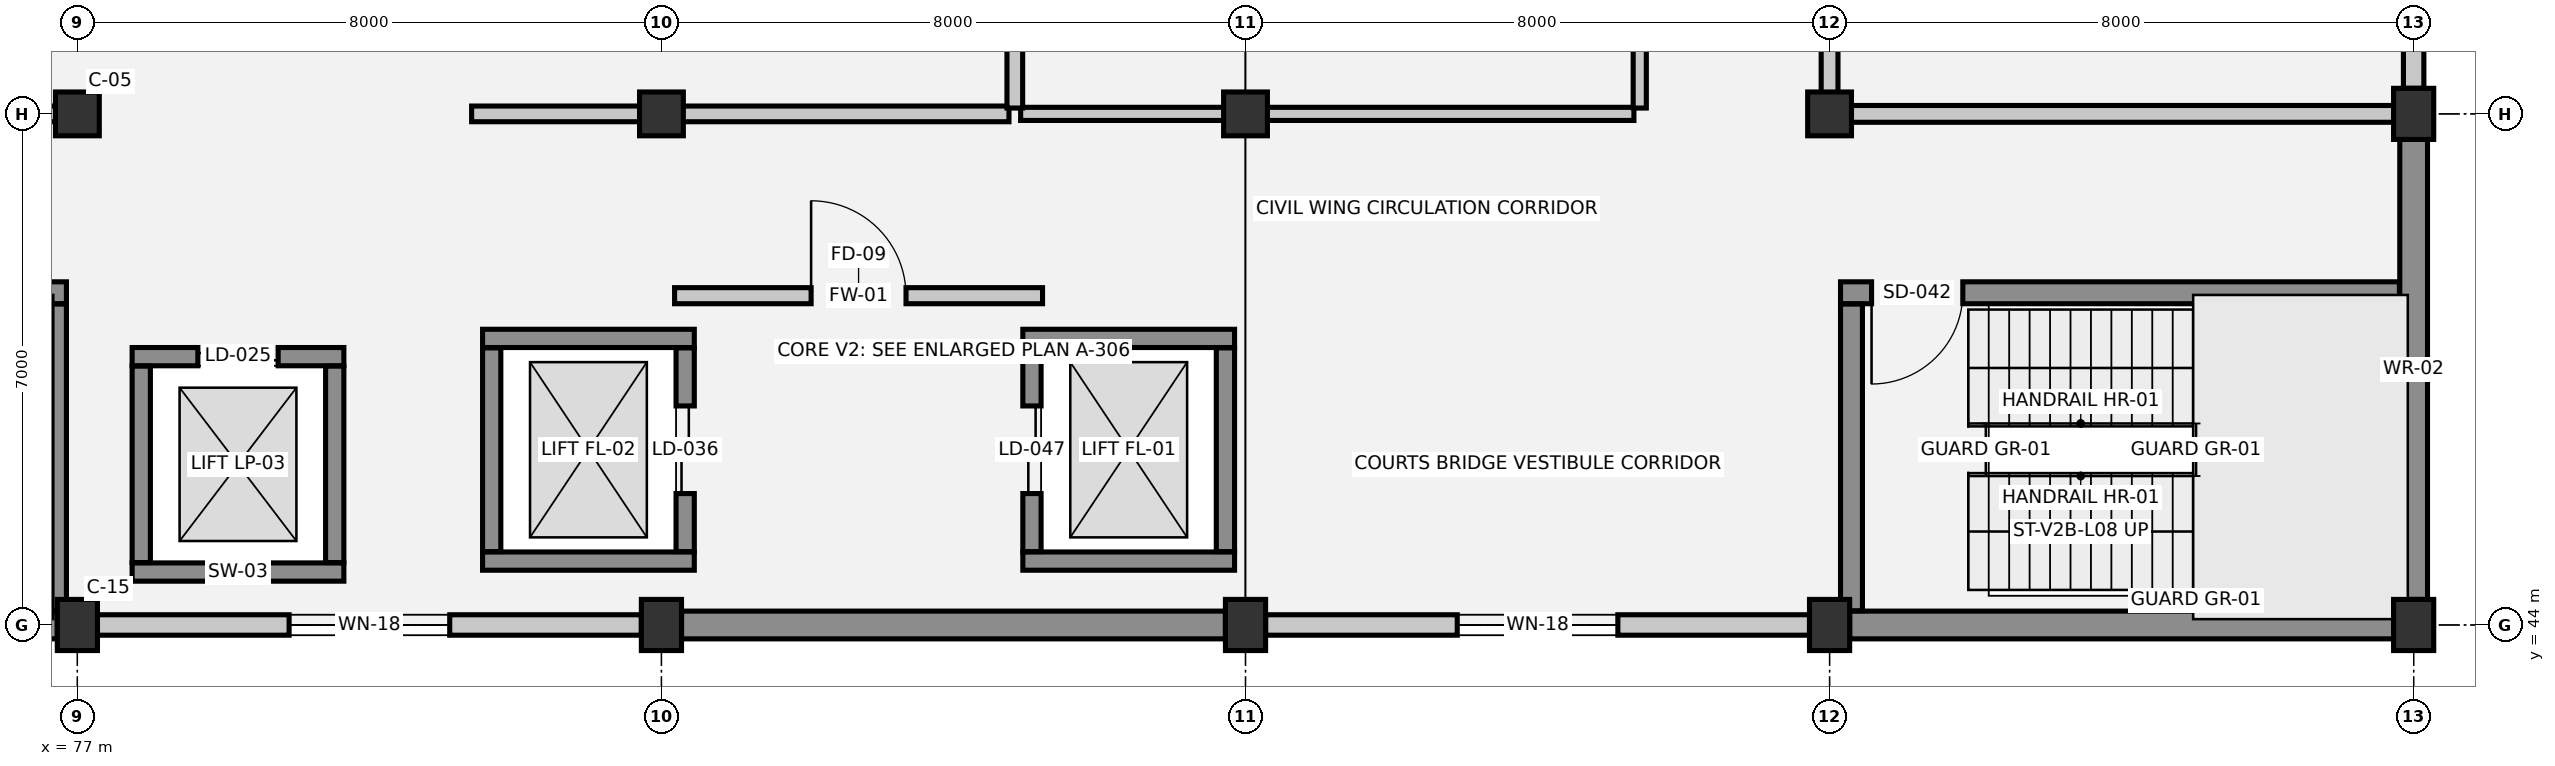
"""IFC4 building model, lengths in metres.
Left out: names, types, materials, properties, quantities, classifications, styles, units other than length and angle.
Written with IfcOpenShell. Run it as: python <this file> out.ifc"""

import sys

from ifc_helpers import new_model, si_unit, direction, frame, frame_2d, origin, origin_2d, place, context, subcontext, project, spatial, rectangle, extrude, element, fill, save


model = new_model("IFC4")
c1 = context("Model", 3, precision=1e-05, world=origin(), true_north=direction((0.0, 1.0)))
c2 = subcontext(c1, "Body", "Model", "MODEL_VIEW")
j1 = project(units=[si_unit("LENGTHUNIT", "METRE"), si_unit("PLANEANGLEUNIT", "RADIAN")], contexts=[c1])
p1 = place(None, origin())
s1 = spatial("IfcSite", under=j1, at=p1, CompositionType="ELEMENT")
p2 = place(p1, origin())
s2 = spatial("IfcBuilding", under=s1, at=p2, CompositionType="ELEMENT")
p3 = place(p2, frame((0.0, 0.0, 29.55)))
s3 = spatial("IfcBuildingStorey", under=s2, at=p3, CompositionType="ELEMENT", Elevation=29.55)
p4 = place(p3, frame((77.0, 44.0, 0.0), z_axis=(0.0, 0.0, 1.0), x_axis=(1.0, 0.0, 0.0)))
e1 = element("IfcColumn", 1, at=p4, inside=s3, PredefinedType="COLUMN", context=c2, shape_type="SweptSolid", body=[
    extrude(rectangle(XDim=0.55, YDim=0.7, at=origin_2d()), origin(), (0.0, 0.0, 1.0), 3.75),
])
p5 = place(p3, frame((77.0, 51.0, 0.0), z_axis=(0.0, 0.0, 1.0), x_axis=(1.0, 0.0, 0.0)))
e2 = element("IfcColumn", 2, at=p5, inside=s3, PredefinedType="COLUMN", context=c2, shape_type="SweptSolid", body=[
    extrude(rectangle(XDim=0.6, YDim=0.6, at=origin_2d()), origin(), (0.0, 0.0, 1.0), 3.75),
])
p6 = place(p3, frame((85.0, 44.0, 0.0), z_axis=(0.0, 0.0, 1.0), x_axis=(1.0, 0.0, 0.0)))
e3 = element("IfcColumn", 3, at=p6, inside=s3, PredefinedType="COLUMN", context=c2, shape_type="SweptSolid", body=[
    extrude(rectangle(XDim=0.55, YDim=0.7, at=origin_2d()), origin(), (0.0, 0.0, 1.0), 3.75),
])
p7 = place(p3, frame((85.0, 51.0, 0.0), z_axis=(0.0, 0.0, 1.0), x_axis=(1.0, 0.0, 0.0)))
e4 = element("IfcColumn", 4, at=p7, inside=s3, PredefinedType="COLUMN", context=c2, shape_type="SweptSolid", body=[
    extrude(rectangle(XDim=0.6, YDim=0.6, at=origin_2d()), origin(), (0.0, 0.0, 1.0), 3.75),
])
p8 = place(p3, frame((93.0, 44.0, 0.0), z_axis=(0.0, 0.0, 1.0), x_axis=(1.0, 0.0, 0.0)))
e5 = element("IfcColumn", 5, at=p8, inside=s3, PredefinedType="COLUMN", context=c2, shape_type="SweptSolid", body=[
    extrude(rectangle(XDim=0.55, YDim=0.7, at=origin_2d()), origin(), (0.0, 0.0, 1.0), 3.75),
])
p9 = place(p3, frame((93.0, 51.0, 0.0), z_axis=(0.0, 0.0, 1.0), x_axis=(1.0, 0.0, 0.0)))
e6 = element("IfcColumn", 6, at=p9, inside=s3, PredefinedType="COLUMN", context=c2, shape_type="SweptSolid", body=[
    extrude(rectangle(XDim=0.6, YDim=0.6, at=origin_2d()), origin(), (0.0, 0.0, 1.0), 3.75),
])
p10 = place(p3, frame((101.0, 44.0, 0.0), z_axis=(0.0, 0.0, 1.0), x_axis=(1.0, 0.0, 0.0)))
e7 = element("IfcColumn", 7, at=p10, inside=s3, PredefinedType="COLUMN", context=c2, shape_type="SweptSolid", body=[
    extrude(rectangle(XDim=0.55, YDim=0.7, at=origin_2d()), origin(), (0.0, 0.0, 1.0), 3.75),
])
p11 = place(p3, frame((101.0, 51.0, 0.0), z_axis=(0.0, 0.0, 1.0), x_axis=(1.0, 0.0, 0.0)))
e8 = element("IfcColumn", 8, at=p11, inside=s3, PredefinedType="COLUMN", context=c2, shape_type="SweptSolid", body=[
    extrude(rectangle(XDim=0.6, YDim=0.6, at=origin_2d()), origin(), (0.0, 0.0, 1.0), 3.75),
])
for number, where, z_axis, x_axis in (
    (9, (109.0, 44.0, 0.0), (0.0, 0.0, 1.0), (1.0, 0.0, 0.0)),
    (10, (109.0, 51.0, 0.0), (0.0, 0.0, 1.0), (1.0, 0.0, 0.0)),
):
    element("IfcColumn", number, at=place(p3, frame(where, z_axis=z_axis, x_axis=x_axis)), inside=s3, PredefinedType="COLUMN", context=c2, shape_type="SweptSolid", body=[
        extrude(rectangle(XDim=0.55, YDim=0.7, at=origin_2d()), origin(), (0.0, 0.0, 1.0), 3.75),
    ])
p12 = place(p3, frame((109.0, 64.65, 0.0), z_axis=(0.0, 0.0, 1.0), x_axis=(0.0, -1.0, 0.0)))
e11 = element("IfcWall", 11, at=p12, inside=s3, PredefinedType="SOLIDWALL", context=c2, shape_type="SweptSolid", body=[
    extrude(rectangle(XDim=13.3, YDim=0.28, at=frame_2d((6.65, 0.0))), origin(), (0.0, 0.0, 1.0), 2.56),
])
p13 = place(p12, frame((5.55, 0.0, 0.9)))
e12 = element("IfcOpeningElement", 12, at=p13, cuts=e11, PredefinedType="OPENING", context=c2, shape_type="SweptSolid", body=[
    extrude(rectangle(XDim=2.2, YDim=1.0, at=frame_2d((1.1, 0.5))), frame((0.0, 0.15, 0.0), z_axis=(0.0, -1.0, 0.0), x_axis=(1.0, 0.0, 0.0)), (0.0, 0.0, 1.0), 0.3),
])
p14 = place(p3, frame((109.0, 50.65, 0.0), z_axis=(0.0, 0.0, 1.0), x_axis=(0.0, -1.0, 0.0)))
e13 = element("IfcWall", 13, at=p14, inside=s3, PredefinedType="STANDARD", context=c2, shape_type="SweptSolid", body=[
    extrude(rectangle(XDim=6.3, YDim=0.38, at=frame_2d((3.15, 0.0))), origin(), (0.0, 0.0, 1.0), 2.56),
])
p15 = place(p3, frame((108.725, 44.0, 0.0), z_axis=(0.0, 0.0, 1.0), x_axis=(-1.0, 0.0, 0.0)))
e14 = element("IfcWall", 14, at=p15, inside=s3, PredefinedType="STANDARD", context=c2, shape_type="SweptSolid", body=[
    extrude(rectangle(XDim=7.45, YDim=0.38, at=frame_2d((3.725, 0.0))), origin(), (0.0, 0.0, 1.0), 2.56),
])
p16 = place(p3, frame((100.725, 44.0, 0.0), z_axis=(0.0, 0.0, 1.0), x_axis=(-1.0, 0.0, 0.0)))
e15 = element("IfcWall", 15, at=p16, inside=s3, PredefinedType="SOLIDWALL", context=c2, shape_type="SweptSolid", body=[
    extrude(rectangle(XDim=7.45, YDim=0.28, at=frame_2d((3.725, 0.0))), origin(), (0.0, 0.0, 1.0), 2.56),
])
p17 = place(p16, frame((2.625, 0.0, 0.9)))
e16 = element("IfcOpeningElement", 16, at=p17, cuts=e15, PredefinedType="OPENING", context=c2, shape_type="SweptSolid", body=[
    extrude(rectangle(XDim=2.2, YDim=1.0, at=frame_2d((1.1, 0.5))), frame((0.0, 0.15, 0.0), z_axis=(0.0, -1.0, 0.0), x_axis=(1.0, 0.0, 0.0)), (0.0, 0.0, 1.0), 0.3),
])
p18 = place(p3, frame((92.725, 44.0, 0.0), z_axis=(0.0, 0.0, 1.0), x_axis=(-1.0, 0.0, 0.0)))
e17 = element("IfcWall", 17, at=p18, inside=s3, PredefinedType="STANDARD", context=c2, shape_type="SweptSolid", body=[
    extrude(rectangle(XDim=7.45, YDim=0.38, at=frame_2d((3.725, 0.0))), origin(), (0.0, 0.0, 1.0), 2.56),
])
p19 = place(p3, frame((84.725, 44.0, 0.0), z_axis=(0.0, 0.0, 1.0), x_axis=(-1.0, 0.0, 0.0)))
e18 = element("IfcWall", 18, at=p19, inside=s3, PredefinedType="SOLIDWALL", context=c2, shape_type="SweptSolid", body=[
    extrude(rectangle(XDim=7.45, YDim=0.28, at=frame_2d((3.725, 0.0))), origin(), (0.0, 0.0, 1.0), 2.56),
])
p20 = place(p19, frame((2.625, 0.0, 0.9)))
e19 = element("IfcOpeningElement", 19, at=p20, cuts=e18, PredefinedType="OPENING", context=c2, shape_type="SweptSolid", body=[
    extrude(rectangle(XDim=2.2, YDim=1.0, at=frame_2d((1.1, 0.5))), frame((0.0, 0.15, 0.0), z_axis=(0.0, -1.0, 0.0), x_axis=(1.0, 0.0, 0.0)), (0.0, 0.0, 1.0), 0.3),
])
p21 = place(p3, frame((76.725, 44.0, 0.0), z_axis=(0.0, 0.0, 1.0), x_axis=(-1.0, 0.0, 0.0)))
e20 = element("IfcWall", 20, at=p21, inside=s3, PredefinedType="STANDARD", context=c2, shape_type="SweptSolid", body=[
    extrude(rectangle(XDim=7.45, YDim=0.38, at=frame_2d((3.725, 0.0))), origin(), (0.0, 0.0, 1.0), 2.56),
])
p22 = place(p3, frame((77.75, 44.725, 0.0), z_axis=(0.0, 0.0, 1.0), x_axis=(1.0, 0.0, 0.0)))
e21 = element("IfcWall", 21, at=p22, inside=s3, PredefinedType="SHEAR", context=c2, shape_type="SweptSolid", body=[
    extrude(rectangle(XDim=2.9, YDim=0.25, at=frame_2d((1.45, 0.0))), origin(), (0.0, 0.0, 1.0), 3.75),
])
p23 = place(p3, frame((80.65, 47.675, 0.0), z_axis=(0.0, 0.0, 1.0), x_axis=(-1.0, 0.0, 0.0)))
e22 = element("IfcWall", 22, at=p23, inside=s3, PredefinedType="SHEAR", context=c2, shape_type="SweptSolid", body=[
    extrude(rectangle(XDim=2.9, YDim=0.25, at=frame_2d((1.45, 0.0))), origin(), (0.0, 0.0, 1.0), 3.75),
])
p24 = place(p23, frame((0.9, 0.0, 0.0)))
e23 = element("IfcOpeningElement", 23, at=p24, cuts=e22, PredefinedType="OPENING", context=c2, shape_type="SweptSolid", body=[
    extrude(rectangle(XDim=1.1, YDim=2.15, at=frame_2d((0.55, 1.075))), frame((0.0, 0.135, 0.0), z_axis=(0.0, -1.0, 0.0), x_axis=(1.0, 0.0, 0.0)), (0.0, 0.0, 1.0), 0.27),
])
for number, where, z_axis, x_axis in (
    (24, (77.875, 47.545, 0.0), (0.0, 0.0, 1.0), (0.0, -1.0, 0.0)),
    (25, (80.525, 44.855, 0.0), (0.0, 0.0, 1.0), (0.0, 1.0, 0.0)),
):
    element("IfcWall", number, at=place(p3, frame(where, z_axis=z_axis, x_axis=x_axis)), inside=s3, PredefinedType="SHEAR", context=c2, shape_type="SweptSolid", body=[
        extrude(rectangle(XDim=2.69, YDim=0.25, at=frame_2d((1.345, 0.0))), origin(), (0.0, 0.0, 1.0), 3.75),
    ])
for number, where, z_axis, x_axis in (
    (26, (82.55, 44.875, 0.0), (0.0, 0.0, 1.0), (1.0, 0.0, 0.0)),
    (27, (85.45, 47.925, 0.0), (0.0, 0.0, 1.0), (-1.0, 0.0, 0.0)),
):
    element("IfcWall", number, at=place(p3, frame(where, z_axis=z_axis, x_axis=x_axis)), inside=s3, PredefinedType="SHEAR", context=c2, shape_type="SweptSolid", body=[
        extrude(rectangle(XDim=2.9, YDim=0.25, at=frame_2d((1.45, 0.0))), origin(), (0.0, 0.0, 1.0), 3.75),
    ])
p25 = place(p3, frame((82.675, 47.795, 0.0), z_axis=(0.0, 0.0, 1.0), x_axis=(0.0, -1.0, 0.0)))
e28 = element("IfcWall", 28, at=p25, inside=s3, PredefinedType="SHEAR", context=c2, shape_type="SweptSolid", body=[
    extrude(rectangle(XDim=2.79, YDim=0.25, at=frame_2d((1.395, 0.0))), origin(), (0.0, 0.0, 1.0), 3.75),
])
p26 = place(p3, frame((85.325, 45.005, 0.0), z_axis=(0.0, 0.0, 1.0), x_axis=(0.0, 1.0, 0.0)))
e29 = element("IfcWall", 29, at=p26, inside=s3, PredefinedType="SHEAR", context=c2, shape_type="SweptSolid", body=[
    extrude(rectangle(XDim=2.79, YDim=0.25, at=frame_2d((1.395, 0.0))), origin(), (0.0, 0.0, 1.0), 3.75),
])
p27 = place(p26, frame((0.795, 0.0, 0.0)))
e30 = element("IfcOpeningElement", 30, at=p27, cuts=e29, PredefinedType="OPENING", context=c2, shape_type="SweptSolid", body=[
    extrude(rectangle(XDim=1.2, YDim=2.2, at=frame_2d((0.6, 1.1))), frame((0.0, 0.135, 0.0), z_axis=(0.0, -1.0, 0.0), x_axis=(1.0, 0.0, 0.0)), (0.0, 0.0, 1.0), 0.27),
])
for number, where, z_axis, x_axis in (
    (31, (89.95, 44.875, 0.0), (0.0, 0.0, 1.0), (1.0, 0.0, 0.0)),
    (32, (92.85, 47.925, 0.0), (0.0, 0.0, 1.0), (-1.0, 0.0, 0.0)),
):
    element("IfcWall", number, at=place(p3, frame(where, z_axis=z_axis, x_axis=x_axis)), inside=s3, PredefinedType="SHEAR", context=c2, shape_type="SweptSolid", body=[
        extrude(rectangle(XDim=2.9, YDim=0.25, at=frame_2d((1.45, 0.0))), origin(), (0.0, 0.0, 1.0), 3.75),
    ])
p28 = place(p3, frame((90.075, 47.795, 0.0), z_axis=(0.0, 0.0, 1.0), x_axis=(0.0, -1.0, 0.0)))
e33 = element("IfcWall", 33, at=p28, inside=s3, PredefinedType="SHEAR", context=c2, shape_type="SweptSolid", body=[
    extrude(rectangle(XDim=2.79, YDim=0.25, at=frame_2d((1.395, 0.0))), origin(), (0.0, 0.0, 1.0), 3.75),
])
p29 = place(p28, frame((0.795, 0.0, 0.0)))
e34 = element("IfcOpeningElement", 34, at=p29, cuts=e33, PredefinedType="OPENING", context=c2, shape_type="SweptSolid", body=[
    extrude(rectangle(XDim=1.2, YDim=2.2, at=frame_2d((0.6, 1.1))), frame((0.0, 0.135, 0.0), z_axis=(0.0, -1.0, 0.0), x_axis=(1.0, 0.0, 0.0)), (0.0, 0.0, 1.0), 0.27),
])
p30 = place(p3, frame((92.725, 45.005, 0.0), z_axis=(0.0, 0.0, 1.0), x_axis=(0.0, 1.0, 0.0)))
e35 = element("IfcWall", 35, at=p30, inside=s3, PredefinedType="SHEAR", context=c2, shape_type="SweptSolid", body=[
    extrude(rectangle(XDim=2.79, YDim=0.25, at=frame_2d((1.395, 0.0))), origin(), (0.0, 0.0, 1.0), 3.75),
])
p31 = place(p3, frame((76.85, 48.55, 0.0), z_axis=(0.0, 0.0, 1.0), x_axis=(-1.0, 0.0, 0.0)))
e36 = element("IfcWall", 36, at=p31, inside=s3, PredefinedType="SHEAR", context=c2, shape_type="SweptSolid", body=[
    extrude(rectangle(XDim=7.7, YDim=0.3, at=frame_2d((3.85, 0.0))), origin(), (0.0, 0.0, 1.0), 3.47),
])
p32 = place(p31, frame((6.025, 0.0, 0.0)))
e37 = element("IfcOpeningElement", 37, at=p32, cuts=e36, PredefinedType="OPENING", context=c2, shape_type="SweptSolid", body=[
    extrude(rectangle(XDim=1.25, YDim=2.15, at=frame_2d((0.625, 1.075))), frame((0.0, 0.16, 0.0), z_axis=(0.0, -1.0, 0.0), x_axis=(1.0, 0.0, 0.0)), (0.0, 0.0, 1.0), 0.32),
])
p33 = place(p3, frame((76.7, 44.195, 0.0), z_axis=(0.0, 0.0, 1.0), x_axis=(0.0, 1.0, 0.0)))
e38 = element("IfcWall", 38, at=p33, inside=s3, PredefinedType="SHEAR", context=c2, shape_type="SweptSolid", body=[
    extrude(rectangle(XDim=4.2, YDim=0.3, at=frame_2d((2.1, 0.0))), origin(), (0.0, 0.0, 1.0), 3.47),
])
p34 = place(p3, frame((108.805, 48.55, 0.0), z_axis=(0.0, 0.0, 1.0), x_axis=(-1.0, 0.0, 0.0)))
e39 = element("IfcWall", 39, at=p34, inside=s3, PredefinedType="SHEAR", context=c2, shape_type="SweptSolid", body=[
    extrude(rectangle(XDim=7.655, YDim=0.3, at=frame_2d((3.828, 0.0))), origin(), (0.0, 0.0, 1.0), 3.47),
])
p35 = place(p34, frame((5.98, 0.0, 0.0)))
e40 = element("IfcOpeningElement", 40, at=p35, cuts=e39, PredefinedType="OPENING", context=c2, shape_type="SweptSolid", body=[
    extrude(rectangle(XDim=1.25, YDim=2.15, at=frame_2d((0.625, 1.075))), frame((0.0, 0.16, 0.0), z_axis=(0.0, -1.0, 0.0), x_axis=(1.0, 0.0, 0.0)), (0.0, 0.0, 1.0), 0.32),
])
p36 = place(p3, frame((101.3, 48.395, 0.0), z_axis=(0.0, 0.0, 1.0), x_axis=(0.0, -1.0, 0.0)))
e41 = element("IfcWall", 41, at=p36, inside=s3, PredefinedType="SHEAR", context=c2, shape_type="SweptSolid", body=[
    extrude(rectangle(XDim=4.2, YDim=0.3, at=frame_2d((2.1, 0.0))), origin(), (0.0, 0.0, 1.0), 3.47),
])
p37 = place(p3, frame((85.18, 48.51, 0.0), z_axis=(0.0, 0.0, 1.0), x_axis=(1.0, 0.0, 0.0)))
e42 = element("IfcWall", 42, at=p37, inside=s3, PredefinedType="SOLIDWALL", context=c2, shape_type="SweptSolid", body=[
    extrude(rectangle(XDim=5.04, YDim=0.22, at=frame_2d((2.52, 0.0))), origin(), (0.0, 0.0, 1.0), 3.47),
])
p38 = place(p37, frame((1.87, 0.0, 0.0)))
e43 = element("IfcOpeningElement", 43, at=p38, cuts=e42, PredefinedType="OPENING", context=c2, shape_type="SweptSolid", body=[
    extrude(rectangle(XDim=1.3, YDim=2.15, at=frame_2d((0.65, 1.075))), frame((0.0, 0.12, 0.0), z_axis=(0.0, -1.0, 0.0), x_axis=(1.0, 0.0, 0.0)), (0.0, 0.0, 1.0), 0.24),
])
p39 = place(p3, frame((76.0, 51.0, 0.0), z_axis=(0.0, 0.0, 1.0), x_axis=(1.0, 0.0, 0.0)))
e44 = element("IfcWall", 44, at=p39, inside=s3, PredefinedType="PARTITIONING", context=c2, shape_type="SweptSolid", body=[
    extrude(rectangle(XDim=1.2, YDim=0.215, at=frame_2d((0.6, 0.0))), origin(), (0.0, 0.0, 1.0), 2.78),
])
p40 = place(p3, frame((82.4, 51.0, 0.0), z_axis=(0.0, 0.0, 1.0), x_axis=(1.0, 0.0, 0.0)))
e45 = element("IfcWall", 45, at=p40, inside=s3, PredefinedType="PARTITIONING", context=c2, shape_type="SweptSolid", body=[
    extrude(rectangle(XDim=7.36, YDim=0.215, at=frame_2d((3.68, 0.0))), origin(), (0.0, 0.0, 1.0), 2.78),
])
p41 = place(p3, frame((89.92, 51.0, 0.0), z_axis=(0.0, 0.0, 1.0), x_axis=(1.0, 0.0, 0.0)))
e46 = element("IfcWall", 46, at=p41, inside=s3, PredefinedType="PARTITIONING", context=c2, shape_type="SweptSolid", body=[
    extrude(rectangle(XDim=8.4, YDim=0.18, at=frame_2d((4.2, 0.0))), origin(), (0.0, 0.0, 1.0), 2.78),
])
p42 = place(p3, frame((101.08, 51.0, 0.0), z_axis=(0.0, 0.0, 1.0), x_axis=(1.0, 0.0, 0.0)))
e47 = element("IfcWall", 47, at=p42, inside=s3, PredefinedType="PARTITIONING", context=c2, shape_type="SweptSolid", body=[
    extrude(rectangle(XDim=7.84, YDim=0.23, at=frame_2d((3.92, 0.0))), origin(), (0.0, 0.0, 1.0), 2.78),
])
p43 = place(p3, frame((89.84, 51.08, 0.0), z_axis=(0.0, 0.0, 1.0), x_axis=(0.0, 1.0, 0.0)))
e48 = element("IfcWall", 48, at=p43, inside=s3, PredefinedType="PARTITIONING", context=c2, shape_type="SweptSolid", body=[
    extrude(rectangle(XDim=13.84, YDim=0.215, at=frame_2d((6.92, 0.0))), origin(), (0.0, 0.0, 1.0), 3.39),
])
p44 = place(p3, frame((98.4, 51.08, 0.0), z_axis=(0.0, 0.0, 1.0), x_axis=(0.0, 1.0, 0.0)))
e49 = element("IfcWall", 49, at=p44, inside=s3, PredefinedType="PARTITIONING", context=c2, shape_type="SweptSolid", body=[
    extrude(rectangle(XDim=13.84, YDim=0.18, at=frame_2d((6.92, 0.0))), origin(), (0.0, 0.0, 1.0), 3.39),
])
p45 = place(p44, frame((6.345, 0.0, 0.0)))
e50 = element("IfcOpeningElement", 50, at=p45, cuts=e49, PredefinedType="OPENING", context=c2, shape_type="SweptSolid", body=[
    extrude(rectangle(XDim=1.15, YDim=2.2, at=frame_2d((0.575, 1.1))), frame((0.0, 0.1, 0.0), z_axis=(0.0, -1.0, 0.0), x_axis=(1.0, 0.0, 0.0)), (0.0, 0.0, 1.0), 0.2),
])
p46 = place(p3, frame((101.0, 51.08, 0.0), z_axis=(0.0, 0.0, 1.0), x_axis=(0.0, 1.0, 0.0)))
e51 = element("IfcWall", 51, at=p46, inside=s3, PredefinedType="PARTITIONING", context=c2, shape_type="SweptSolid", body=[
    extrude(rectangle(XDim=13.84, YDim=0.23, at=frame_2d((6.92, 0.0))), origin(), (0.0, 0.0, 1.0), 2.58),
])
p47 = place(p46, frame((6.07, 0.0, 0.0)))
e52 = element("IfcOpeningElement", 52, at=p47, cuts=e51, PredefinedType="OPENING", context=c2, shape_type="SweptSolid", body=[
    extrude(rectangle(XDim=1.7, YDim=2.3, at=frame_2d((0.85, 1.15))), frame((0.0, 0.125, 0.0), z_axis=(0.0, -1.0, 0.0), x_axis=(1.0, 0.0, 0.0)), (0.0, 0.0, 1.0), 0.25),
])
p48 = place(p17, origin())
e53 = element("IfcWindow", 53, at=p48, inside=s3, PartitioningType="SINGLE_PANEL", PredefinedType="WINDOW", context=c2, shape_type="SweptSolid", body=[
    extrude(rectangle(XDim=2.2, YDim=1.0, at=frame_2d((1.1, 0.5))), frame((0.0, 0.03, 0.0), z_axis=(0.0, -1.0, 0.0), x_axis=(1.0, 0.0, 0.0)), (0.0, 0.0, 1.0), 0.06),
])
fill(e16, e53)
p49 = place(p20, origin())
e54 = element("IfcWindow", 54, at=p49, inside=s3, PartitioningType="SINGLE_PANEL", PredefinedType="WINDOW", context=c2, shape_type="SweptSolid", body=[
    extrude(rectangle(XDim=2.2, YDim=1.0, at=frame_2d((1.1, 0.5))), frame((0.0, 0.03, 0.0), z_axis=(0.0, -1.0, 0.0), x_axis=(1.0, 0.0, 0.0)), (0.0, 0.0, 1.0), 0.06),
])
fill(e19, e54)
p50 = place(p24, origin())
e55 = element("IfcDoor", 55, at=p50, inside=s3, OperationType="DOUBLE_DOOR_SLIDING", PredefinedType="DOOR", context=c2, shape_type="SweptSolid", body=[
    extrude(rectangle(XDim=1.1, YDim=2.15, at=frame_2d((0.55, 1.075))), frame((0.0, 0.025, 0.0), z_axis=(0.0, -1.0, 0.0), x_axis=(1.0, 0.0, 0.0)), (0.0, 0.0, 1.0), 0.05),
])
fill(e23, e55)
p51 = place(p27, origin())
e56 = element("IfcDoor", 56, at=p51, inside=s3, OperationType="DOUBLE_DOOR_SLIDING", PredefinedType="DOOR", context=c2, shape_type="SweptSolid", body=[
    extrude(rectangle(XDim=1.2, YDim=2.2, at=frame_2d((0.6, 1.1))), frame((0.0, 0.025, 0.0), z_axis=(0.0, -1.0, 0.0), x_axis=(1.0, 0.0, 0.0)), (0.0, 0.0, 1.0), 0.05),
])
fill(e30, e56)
p52 = place(p29, origin())
e57 = element("IfcDoor", 57, at=p52, inside=s3, OperationType="DOUBLE_DOOR_SLIDING", PredefinedType="DOOR", context=c2, shape_type="SweptSolid", body=[
    extrude(rectangle(XDim=1.2, YDim=2.2, at=frame_2d((0.6, 1.1))), frame((0.0, 0.025, 0.0), z_axis=(0.0, -1.0, 0.0), x_axis=(1.0, 0.0, 0.0)), (0.0, 0.0, 1.0), 0.05),
])
fill(e34, e57)
p53 = place(p35, origin())
e58 = element("IfcDoor", 58, at=p53, inside=s3, OperationType="SINGLE_SWING_RIGHT", PredefinedType="DOOR", context=c2, shape_type="SweptSolid", body=[
    extrude(rectangle(XDim=1.25, YDim=2.15, at=frame_2d((0.625, 1.075))), frame((0.0, 0.025, 0.0), z_axis=(0.0, -1.0, 0.0), x_axis=(1.0, 0.0, 0.0)), (0.0, 0.0, 1.0), 0.05),
])
fill(e40, e58)
p54 = place(p38, origin())
e59 = element("IfcDoor", 59, at=p54, inside=s3, OperationType="SINGLE_SWING_LEFT", PredefinedType="DOOR", context=c2, shape_type="SweptSolid", body=[
    extrude(rectangle(XDim=1.3, YDim=2.15, at=frame_2d((0.65, 1.075))), frame((0.0, 0.025, 0.0), z_axis=(0.0, -1.0, 0.0), x_axis=(1.0, 0.0, 0.0)), (0.0, 0.0, 1.0), 0.05),
])
fill(e43, e59)
save(model, sys.argv[1])
